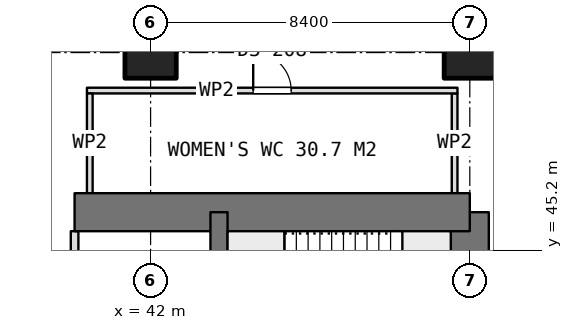
"""IFC4 building model, lengths in metres.
Left out: names, types, materials, properties, quantities, classifications, styles, units other than length and angle.
Written with IfcOpenShell. Run it as: python <this file> out.ifc"""

import sys

from ifc_helpers import new_model, si_unit, direction, frame, frame_2d, origin, origin_2d, place, context, subcontext, project, spatial, rectangle, extrude, element, fill, save


model = new_model("IFC4")
c1 = context("Model", 3, precision=1e-05, world=origin(), true_north=direction((0.0, 1.0)))
c2 = subcontext(c1, "Body", "Model", "MODEL_VIEW")
j1 = project(units=[si_unit("LENGTHUNIT", "METRE"), si_unit("PLANEANGLEUNIT", "RADIAN")], contexts=[c1])
p1 = place(None, origin())
s1 = spatial("IfcSite", under=j1, at=p1, CompositionType="ELEMENT")
p2 = place(p1, origin())
s2 = spatial("IfcBuilding", under=s1, at=p2, CompositionType="ELEMENT")
p3 = place(p2, frame((0.0, 0.0, 195.2)))
s3 = spatial("IfcBuildingStorey", under=s2, at=p3, CompositionType="ELEMENT", Elevation=195.2)
p4 = place(p3, frame((40.0, 46.2, 0.0), z_axis=(0.0, 0.0, 1.0), x_axis=(1.0, 0.0, 0.0)))
e1 = element("IfcWall", 1, at=p4, inside=s3, PredefinedType="SHEAR", context=c2, shape_type="SweptSolid", body=[
    extrude(rectangle(XDim=10.4, YDim=1.0, at=frame_2d((5.2, 0.0))), origin(), (0.0, 0.0, 1.0), 3.75),
])
p5 = place(p3, frame((50.4, 21.0, 0.0), z_axis=(0.0, 0.0, 1.0), x_axis=(0.0, 1.0, 0.0)))
e2 = element("IfcWall", 2, at=p5, inside=s3, PredefinedType="SHEAR", context=c2, shape_type="SweptSolid", body=[
    extrude(rectangle(XDim=25.2, YDim=1.0, at=frame_2d((12.6, 0.0))), origin(), (0.0, 0.0, 1.0), 3.75),
])
p6 = place(p5, frame((16.2, 0.0, 0.0)))
e3 = element("IfcOpeningElement", 3, at=p6, cuts=e2, PredefinedType="OPENING", context=c2, shape_type="SweptSolid", body=[
    extrude(rectangle(XDim=1.2, YDim=2.1, at=frame_2d((0.6, 1.05))), frame((0.0, 0.51, 0.0), z_axis=(0.0, -1.0, 0.0), x_axis=(1.0, 0.0, 0.0)), (0.0, 0.0, 1.0), 1.02),
])
p7 = place(p5, frame((10.05, 0.0, 0.0)))
e4 = element("IfcOpeningElement", 4, at=p7, cuts=e2, PredefinedType="OPENING", context=c2, shape_type="SweptSolid", body=[
    extrude(rectangle(XDim=0.9, YDim=2.1, at=frame_2d((0.45, 1.05))), frame((0.0, 0.51, 0.0), z_axis=(0.0, -1.0, 0.0), x_axis=(1.0, 0.0, 0.0)), (0.0, 0.0, 1.0), 1.02),
])
p8 = place(p5, frame((7.45, 0.0, 0.0)))
e5 = element("IfcOpeningElement", 5, at=p8, cuts=e2, PredefinedType="OPENING", context=c2, shape_type="SweptSolid", body=[
    extrude(rectangle(XDim=0.9, YDim=2.1, at=frame_2d((0.45, 1.05))), frame((0.0, 0.51, 0.0), z_axis=(0.0, -1.0, 0.0), x_axis=(1.0, 0.0, 0.0)), (0.0, 0.0, 1.0), 1.02),
])
p9 = place(p5, frame((0.7, 0.0, 0.0)))
e6 = element("IfcOpeningElement", 6, at=p9, cuts=e2, PredefinedType="OPENING", context=c2, shape_type="SweptSolid", body=[
    extrude(rectangle(XDim=1.2, YDim=2.1, at=frame_2d((0.6, 1.05))), frame((0.0, 0.51, 0.0), z_axis=(0.0, -1.0, 0.0), x_axis=(1.0, 0.0, 0.0)), (0.0, 0.0, 1.0), 1.02),
])
p10 = place(p3, frame((43.8, 21.0, 0.0), z_axis=(0.0, 0.0, 1.0), x_axis=(0.0, 1.0, 0.0)))
e7 = element("IfcWall", 7, at=p10, inside=s3, PredefinedType="SHEAR", context=c2, shape_type="SweptSolid", body=[
    extrude(rectangle(XDim=25.2, YDim=0.45, at=frame_2d((12.6, 0.0))), origin(), (0.0, 0.0, 1.0), 3.75),
])
for number, where, z_axis, x_axis in (
    (8, (42.0, 50.4, 0.0), (0.0, 0.0, 1.0), (1.0, 0.0, 0.0)),
    (9, (50.4, 50.4, 0.0), (0.0, 0.0, 1.0), (1.0, 0.0, 0.0)),
):
    element("IfcColumn", number, at=place(p3, frame(where, z_axis=z_axis, x_axis=x_axis)), inside=s3, PredefinedType="COLUMN", context=c2, shape_type="SweptSolid", body=[
        extrude(rectangle(XDim=1.35, YDim=1.35, at=origin_2d()), origin(), (0.0, 0.0, 1.0), 3.75),
    ])
p11 = place(p3, frame((40.0, 41.625, 0.0), z_axis=(0.0, 0.0, 1.0), x_axis=(0.0, 1.0, 0.0)))
e10 = element("IfcWall", 10, at=p11, inside=s3, PredefinedType="PARTITIONING", context=c2, shape_type="SweptSolid", body=[
    extrude(rectangle(XDim=4.075, YDim=0.2, at=frame_2d((2.038, 0.0))), origin(), (0.0, 0.0, 1.0), 3.5),
])
p12 = place(p11, frame((1.725, 0.0, 0.0)))
e11 = element("IfcOpeningElement", 11, at=p12, cuts=e10, PredefinedType="OPENING", context=c2, shape_type="SweptSolid", body=[
    extrude(rectangle(XDim=0.9, YDim=2.1, at=frame_2d((0.45, 1.05))), frame((0.0, 0.11, 0.0), z_axis=(0.0, -1.0, 0.0), x_axis=(1.0, 0.0, 0.0)), (0.0, 0.0, 1.0), 0.22),
])
p13 = place(p3, frame((40.325, 49.4, 0.0), z_axis=(0.0, 0.0, 1.0), x_axis=(1.0, 0.0, 0.0)))
e12 = element("IfcWall", 12, at=p13, inside=s3, PredefinedType="PARTITIONING", context=c2, shape_type="SweptSolid", body=[
    extrude(rectangle(XDim=9.75, YDim=0.15, at=frame_2d((4.875, 0.0))), origin(), (0.0, 0.0, 1.0), 3.5),
])
p14 = place(p13, frame((4.375, 0.0, 0.0)))
e13 = element("IfcOpeningElement", 13, at=p14, cuts=e12, PredefinedType="OPENING", context=c2, shape_type="SweptSolid", body=[
    extrude(rectangle(XDim=1.0, YDim=2.1, at=frame_2d((0.5, 1.05))), frame((0.0, 0.085, 0.0), z_axis=(0.0, -1.0, 0.0), x_axis=(1.0, 0.0, 0.0)), (0.0, 0.0, 1.0), 0.17),
])
for number, where, z_axis, x_axis in (
    (14, (40.4, 46.7, 0.0), (0.0, 0.0, 1.0), (0.0, 1.0, 0.0)),
    (15, (50.0, 46.7, 0.0), (0.0, 0.0, 1.0), (0.0, 1.0, 0.0)),
):
    element("IfcWall", number, at=place(p3, frame(where, z_axis=z_axis, x_axis=x_axis)), inside=s3, PredefinedType="PARTITIONING", context=c2, shape_type="SweptSolid", body=[
        extrude(rectangle(XDim=2.625, YDim=0.15, at=frame_2d((1.312, 0.0))), origin(), (0.0, 0.0, 1.0), 3.5),
    ])
p15 = place(p14, origin())
e16 = element("IfcDoor", 16, at=p15, inside=s3, OperationType="SINGLE_SWING_LEFT", PredefinedType="DOOR", context=c2, shape_type="SweptSolid", body=[
    extrude(rectangle(XDim=1.0, YDim=2.1, at=frame_2d((0.5, 1.05))), frame((0.0, 0.025, 0.0), z_axis=(0.0, -1.0, 0.0), x_axis=(1.0, 0.0, 0.0)), (0.0, 0.0, 1.0), 0.05),
])
fill(e13, e16)
save(model, sys.argv[1])
